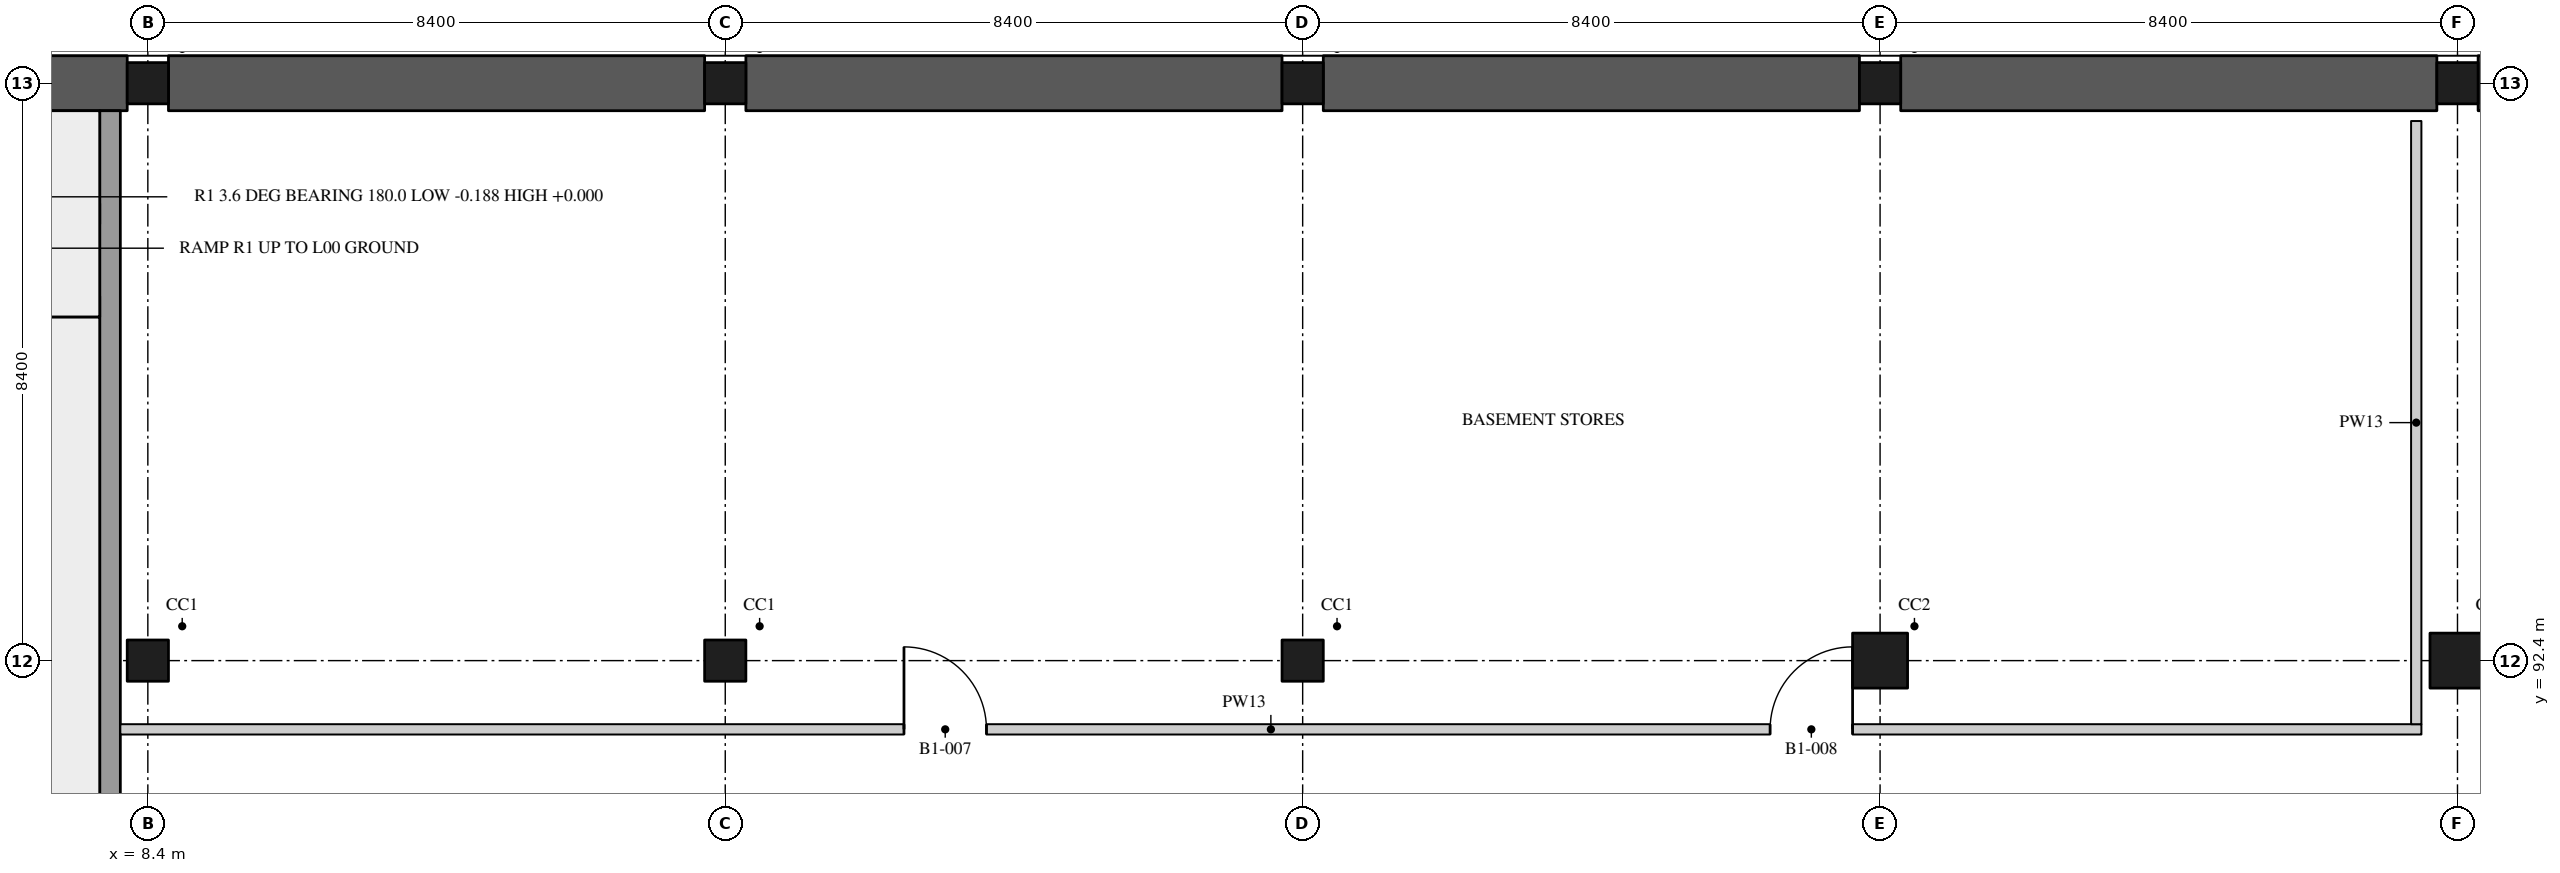
"""IFC4 building model, lengths in metres.
Left out: names, types, materials, properties, quantities, classifications, styles, units other than length and angle.
Written with IfcOpenShell. Run it as: python <this file> out.ifc"""

import sys

from ifc_helpers import new_model, si_unit, direction, frame, frame_2d, origin, origin_2d, place, context, subcontext, project, spatial, rectangle, extrude, element, fill, save


model = new_model("IFC4")
c1 = context("Model", 3, precision=1e-05, world=origin(), true_north=direction((0.0, 1.0)))
c2 = subcontext(c1, "Body", "Model", "MODEL_VIEW")
j1 = project(units=[si_unit("LENGTHUNIT", "METRE"), si_unit("PLANEANGLEUNIT", "RADIAN")], contexts=[c1])
p1 = place(None, origin())
s1 = spatial("IfcSite", under=j1, at=p1, CompositionType="ELEMENT")
p2 = place(p1, origin())
s2 = spatial("IfcBuilding", under=s1, at=p2, CompositionType="ELEMENT")
p3 = place(p2, frame((0.0, 0.0, -4.5)))
s3 = spatial("IfcBuildingStorey", under=s2, at=p3, CompositionType="ELEMENT", Elevation=-4.5)
for number, where, z_axis, x_axis in (
    (1, (8.4, 92.4, 0.0), (0.0, 0.0, 1.0), (1.0, 0.0, 0.0)),
    (2, (8.4, 100.8, 0.0), (0.0, 0.0, 1.0), (1.0, 0.0, 0.0)),
    (3, (16.8, 92.4, 0.0), (0.0, 0.0, 1.0), (1.0, 0.0, 0.0)),
    (4, (16.8, 100.8, 0.0), (0.0, 0.0, 1.0), (1.0, 0.0, 0.0)),
    (5, (25.2, 92.4, 0.0), (0.0, 0.0, 1.0), (1.0, 0.0, 0.0)),
    (6, (25.2, 100.8, 0.0), (0.0, 0.0, 1.0), (1.0, 0.0, 0.0)),
):
    element("IfcColumn", number, at=place(p3, frame(where, z_axis=z_axis, x_axis=x_axis)), inside=s3, PredefinedType="COLUMN", context=c2, shape_type="SweptSolid", body=[
        extrude(rectangle(XDim=0.6, YDim=0.6, at=origin_2d()), origin(), (0.0, 0.0, 1.0), 4.05),
    ])
p4 = place(p3, frame((33.6, 92.4, 0.0), z_axis=(0.0, 0.0, 1.0), x_axis=(1.0, 0.0, 0.0)))
e7 = element("IfcColumn", 7, at=p4, inside=s3, PredefinedType="COLUMN", context=c2, shape_type="SweptSolid", body=[
    extrude(rectangle(XDim=0.8, YDim=0.8, at=origin_2d()), origin(), (0.0, 0.0, 1.0), 4.05),
])
p5 = place(p3, frame((33.6, 100.8, 0.0), z_axis=(0.0, 0.0, 1.0), x_axis=(1.0, 0.0, 0.0)))
e8 = element("IfcColumn", 8, at=p5, inside=s3, PredefinedType="COLUMN", context=c2, shape_type="SweptSolid", body=[
    extrude(rectangle(XDim=0.6, YDim=0.6, at=origin_2d()), origin(), (0.0, 0.0, 1.0), 4.05),
])
p6 = place(p3, frame((42.0, 92.4, 0.0), z_axis=(0.0, 0.0, 1.0), x_axis=(1.0, 0.0, 0.0)))
e9 = element("IfcColumn", 9, at=p6, inside=s3, PredefinedType="COLUMN", context=c2, shape_type="SweptSolid", body=[
    extrude(rectangle(XDim=0.8, YDim=0.8, at=origin_2d()), origin(), (0.0, 0.0, 1.0), 4.05),
])
p7 = place(p3, frame((42.0, 100.8, 0.0), z_axis=(0.0, 0.0, 1.0), x_axis=(1.0, 0.0, 0.0)))
e10 = element("IfcColumn", 10, at=p7, inside=s3, PredefinedType="COLUMN", context=c2, shape_type="SweptSolid", body=[
    extrude(rectangle(XDim=0.6, YDim=0.6, at=origin_2d()), origin(), (0.0, 0.0, 1.0), 4.05),
])
for number, where, z_axis, x_axis in (
    (11, (0.3, 100.8, 0.0), (0.0, 0.0, 1.0), (1.0, 0.0, 0.0)),
    (12, (8.7, 100.8, 0.0), (0.0, 0.0, 1.0), (1.0, 0.0, 0.0)),
):
    element("IfcWall", number, at=place(p3, frame(where, z_axis=z_axis, x_axis=x_axis)), inside=s3, PredefinedType="SOLIDWALL", context=c2, shape_type="SweptSolid", body=[
        extrude(rectangle(XDim=7.8, YDim=0.8, at=frame_2d((3.9, 0.0))), origin(), (0.0, 0.0, 1.0), 4.05),
    ])
p8 = place(p3, frame((17.1, 100.8, 0.0), z_axis=(0.0, 0.0, 1.0), x_axis=(1.0, 0.0, 0.0)))
e13 = element("IfcWall", 13, at=p8, inside=s3, PredefinedType="SOLIDWALL", context=c2, shape_type="SweptSolid", body=[
    extrude(rectangle(XDim=7.8, YDim=0.8, at=frame_2d((3.9, 0.0))), origin(), (0.0, 0.0, 1.0), 4.05),
])
for number, where, z_axis, x_axis in (
    (14, (25.5, 100.8, 0.0), (0.0, 0.0, 1.0), (1.0, 0.0, 0.0)),
    (15, (33.9, 100.8, 0.0), (0.0, 0.0, 1.0), (1.0, 0.0, 0.0)),
    (16, (42.3, 100.8, 0.0), (0.0, 0.0, 1.0), (1.0, 0.0, 0.0)),
):
    element("IfcWall", number, at=place(p3, frame(where, z_axis=z_axis, x_axis=x_axis)), inside=s3, PredefinedType="SOLIDWALL", context=c2, shape_type="SweptSolid", body=[
        extrude(rectangle(XDim=7.8, YDim=0.8, at=frame_2d((3.9, 0.0))), origin(), (0.0, 0.0, 1.0), 4.05),
    ])
p9 = place(p3, frame((8.0, 91.4, 0.0), z_axis=(0.0, 0.0, 1.0), x_axis=(1.0, 0.0, 0.0)))
e17 = element("IfcWall", 17, at=p9, inside=s3, PredefinedType="PARTITIONING", context=c2, shape_type="SweptSolid", body=[
    extrude(rectangle(XDim=33.475, YDim=0.15, at=frame_2d((16.738, 0.0))), origin(), (0.0, 0.0, 1.0), 4.05),
])
p10 = place(p9, frame((11.4, 0.0, 0.0)))
e18 = element("IfcOpeningElement", 18, at=p10, cuts=e17, PredefinedType="OPENING", context=c2, shape_type="SweptSolid", body=[
    extrude(rectangle(XDim=1.2, YDim=2.1, at=frame_2d((0.6, 1.05))), frame((0.0, 0.085, 0.0), z_axis=(0.0, -1.0, 0.0), x_axis=(1.0, 0.0, 0.0)), (0.0, 0.0, 1.0), 0.17),
])
p11 = place(p9, frame((24.0, 0.0, 0.0)))
e19 = element("IfcOpeningElement", 19, at=p11, cuts=e17, PredefinedType="OPENING", context=c2, shape_type="SweptSolid", body=[
    extrude(rectangle(XDim=1.2, YDim=2.1, at=frame_2d((0.6, 1.05))), frame((0.0, 0.085, 0.0), z_axis=(0.0, -1.0, 0.0), x_axis=(1.0, 0.0, 0.0)), (0.0, 0.0, 1.0), 0.17),
])
p12 = place(p3, frame((41.4, 91.475, 0.0), z_axis=(0.0, 0.0, 1.0), x_axis=(0.0, 1.0, 0.0)))
e20 = element("IfcWall", 20, at=p12, inside=s3, PredefinedType="PARTITIONING", context=c2, shape_type="SweptSolid", body=[
    extrude(rectangle(XDim=8.775, YDim=0.15, at=frame_2d((4.387, 0.0))), origin(), (0.0, 0.0, 1.0), 4.05),
])
p13 = place(p3, frame((7.85, 72.4, 0.0), z_axis=(0.0, 0.0, 1.0), x_axis=(0.0, 1.0, 0.0)))
e21 = element("IfcWall", 21, at=p13, inside=s3, PredefinedType="SOLIDWALL", context=c2, shape_type="SweptSolid", body=[
    extrude(rectangle(XDim=28.0, YDim=0.3, at=frame_2d((14.0, 0.0))), origin(), (0.0, 0.0, 1.0), 4.5),
])
p14 = place(p3, frame((7.7, 97.55, 0.0), z_axis=(0.0, 0.0, 1.0), x_axis=(-1.0, 0.0, 0.0)))
e22 = element("IfcWall", 22, at=p14, inside=s3, PredefinedType="SOLIDWALL", context=c2, shape_type="SweptSolid", body=[
    extrude(rectangle(XDim=7.0, YDim=0.3, at=frame_2d((3.5, 0.0))), origin(), (0.0, 0.0, 1.0), 4.012),
])
p15 = place(p3, frame((7.7, 98.9, 0.0), z_axis=(0.0, 0.0, 1.0), x_axis=(-1.0, 0.0, 0.0)))
e23 = element("IfcWall", 23, at=p15, inside=s3, PredefinedType="SOLIDWALL", context=c2, shape_type="SweptSolid", body=[
    extrude(rectangle(XDim=7.0, YDim=0.3, at=frame_2d((3.5, 0.0))), origin(), (0.0, 0.0, 1.0), 4.097),
])
p16 = place(p10, origin())
e24 = element("IfcDoor", 24, at=p16, inside=s3, OperationType="SINGLE_SWING_RIGHT", PredefinedType="DOOR", context=c2, shape_type="SweptSolid", body=[
    extrude(rectangle(XDim=1.2, YDim=2.1, at=frame_2d((0.6, 1.05))), frame((0.0, 0.03, 0.0), z_axis=(0.0, -1.0, 0.0), x_axis=(1.0, 0.0, 0.0)), (0.0, 0.0, 1.0), 0.06),
])
fill(e18, e24)
p17 = place(p11, origin())
e25 = element("IfcDoor", 25, at=p17, inside=s3, OperationType="SINGLE_SWING_LEFT", PredefinedType="DOOR", context=c2, shape_type="SweptSolid", body=[
    extrude(rectangle(XDim=1.2, YDim=2.1, at=frame_2d((0.6, 1.05))), frame((0.0, 0.03, 0.0), z_axis=(0.0, -1.0, 0.0), x_axis=(1.0, 0.0, 0.0)), (0.0, 0.0, 1.0), 0.06),
])
fill(e19, e25)
save(model, sys.argv[1])
